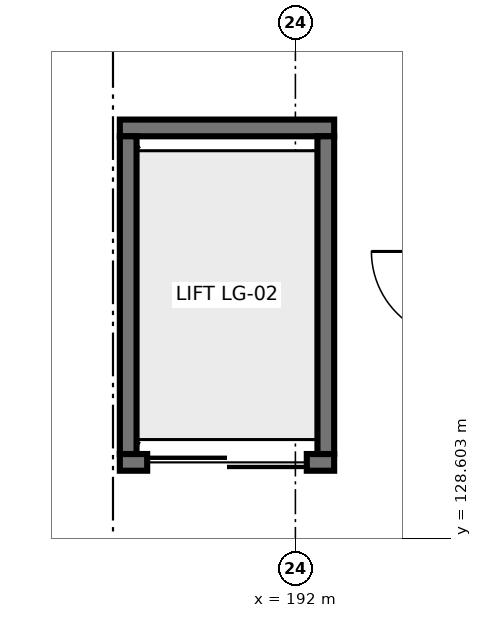
"""IFC4 building model, lengths in metres.
Left out: names, types, materials, properties, quantities, classifications, styles, units other than length and angle.
Written with IfcOpenShell. Run it as: python <this file> out.ifc"""

import sys

from ifc_helpers import new_model, si_unit, direction, frame, frame_2d, origin, place, context, subcontext, project, spatial, rectangle, extrude, element, fill, save


model = new_model("IFC4")
c1 = context("Model", 3, precision=1e-05, world=origin(), true_north=direction((0.0, 1.0)))
c2 = subcontext(c1, "Body", "Model", "MODEL_VIEW")
j1 = project(units=[si_unit("LENGTHUNIT", "METRE"), si_unit("PLANEANGLEUNIT", "RADIAN")], contexts=[c1])
p1 = place(None, origin())
s1 = spatial("IfcSite", under=j1, at=p1, CompositionType="ELEMENT")
p2 = place(p1, origin())
s2 = spatial("IfcBuilding", under=s1, at=p2, CompositionType="ELEMENT")
p3 = place(p2, frame((0.0, 0.0, -5.4)))
s3 = spatial("IfcBuildingStorey", under=s2, at=p3, CompositionType="ELEMENT", Elevation=-5.4)
p4 = place(p3, frame((189.69, 129.6, 0.0), z_axis=(0.0, 0.0, 1.0), x_axis=(1.0, 0.0, 0.0)))
e1 = element("IfcWall", 1, at=p4, inside=s3, PredefinedType="SHEAR", context=c2, shape_type="SweptSolid", body=[
    extrude(rectangle(XDim=2.82, YDim=0.22, at=frame_2d((1.41, 0.0))), origin(), (0.0, 0.0, 1.0), 4.314),
])
p5 = place(p4, frame((0.36, 0.0, 0.0)))
e2 = element("IfcOpeningElement", 2, at=p5, cuts=e1, PredefinedType="OPENING", context=c2, shape_type="SweptSolid", body=[
    extrude(rectangle(XDim=2.1, YDim=2.45, at=frame_2d((1.05, 1.225))), frame((0.0, 0.12, 0.0), z_axis=(0.0, -1.0, 0.0), x_axis=(1.0, 0.0, 0.0)), (0.0, 0.0, 1.0), 0.24),
])
p6 = place(p3, frame((189.69, 134.0, 0.0), z_axis=(0.0, 0.0, 1.0), x_axis=(1.0, 0.0, 0.0)))
e3 = element("IfcWall", 3, at=p6, inside=s3, PredefinedType="SHEAR", context=c2, shape_type="SweptSolid", body=[
    extrude(rectangle(XDim=2.82, YDim=0.22, at=frame_2d((1.41, 0.0))), origin(), (0.0, 0.0, 1.0), 4.314),
])
p7 = place(p3, frame((189.8, 129.71, 0.0), z_axis=(0.0, 0.0, 1.0), x_axis=(0.0, 1.0, 0.0)))
e4 = element("IfcWall", 4, at=p7, inside=s3, PredefinedType="SHEAR", context=c2, shape_type="SweptSolid", body=[
    extrude(rectangle(XDim=4.18, YDim=0.22, at=frame_2d((2.09, 0.0))), origin(), (0.0, 0.0, 1.0), 5.1),
])
p8 = place(p3, frame((192.4, 129.71, 0.0), z_axis=(0.0, 0.0, 1.0), x_axis=(0.0, 1.0, 0.0)))
e5 = element("IfcWall", 5, at=p8, inside=s3, PredefinedType="SHEAR", context=c2, shape_type="SweptSolid", body=[
    extrude(rectangle(XDim=4.18, YDim=0.22, at=frame_2d((2.09, 0.0))), origin(), (0.0, 0.0, 1.0), 4.314),
])
p9 = place(p5, origin())
e6 = element("IfcDoor", 6, at=p9, inside=s3, OperationType="DOUBLE_DOOR_SLIDING", PredefinedType="DOOR", context=c2, shape_type="SweptSolid", body=[
    extrude(rectangle(XDim=2.1, YDim=2.45, at=frame_2d((1.05, 1.225))), frame((0.0, 0.025, 0.0), z_axis=(0.0, -1.0, 0.0), x_axis=(1.0, 0.0, 0.0)), (0.0, 0.0, 1.0), 0.05),
])
fill(e2, e6)
save(model, sys.argv[1])
